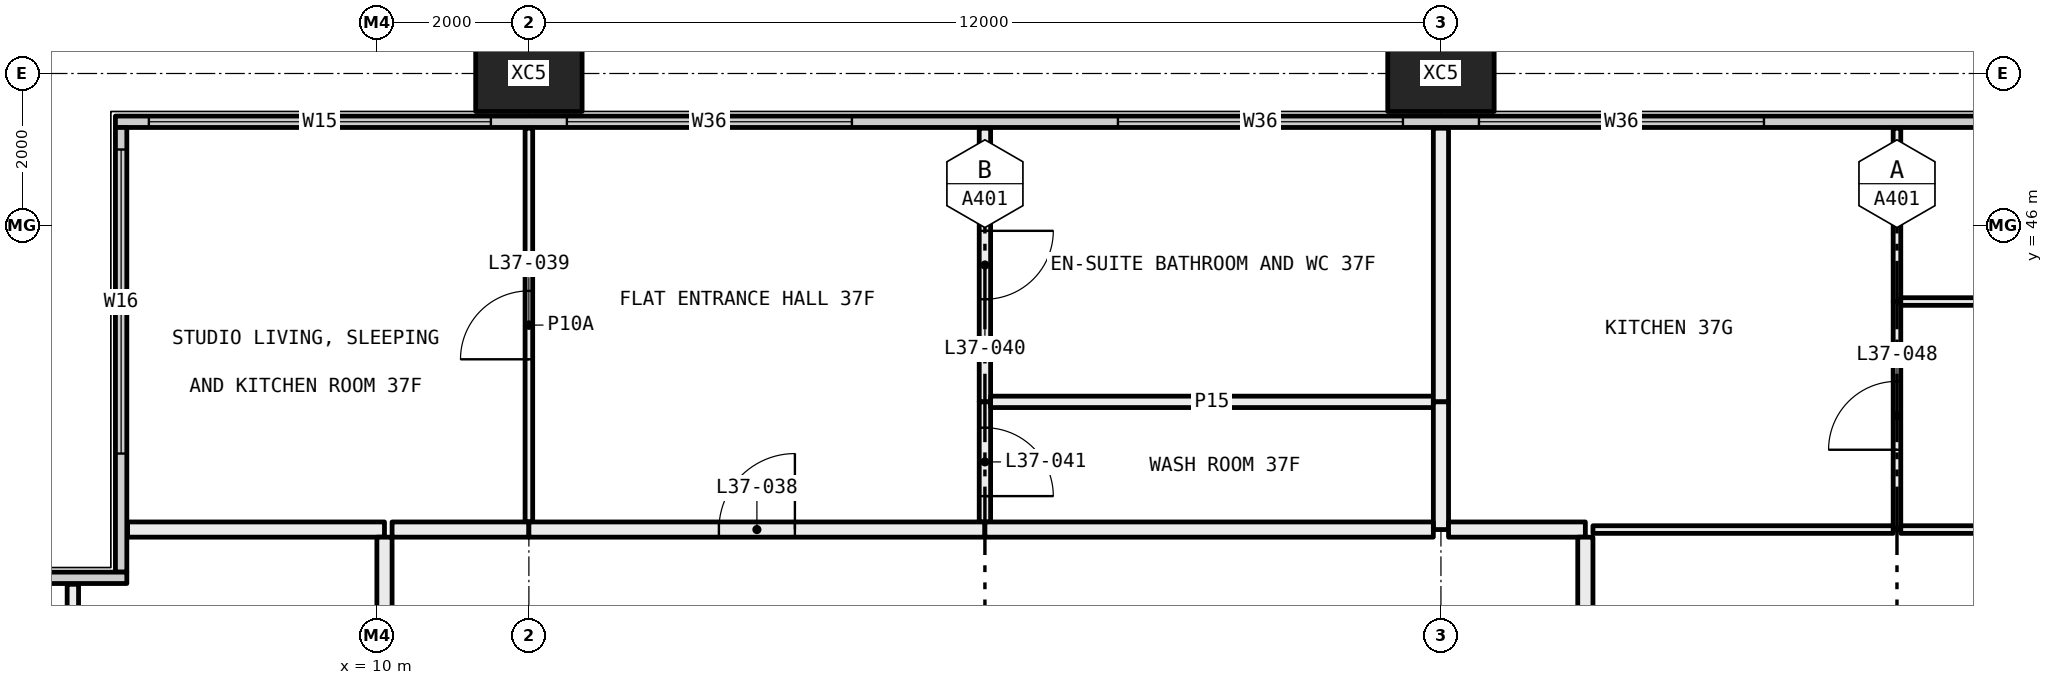
"""IFC4 building model, lengths in metres.
Left out: names, types, materials, properties, quantities, classifications, styles, units other than length and angle.
Written with IfcOpenShell. Run it as: python <this file> out.ifc"""

import sys

from ifc_helpers import new_model, si_unit, direction, frame, frame_2d, origin, origin_2d, place, context, subcontext, project, spatial, rectangle, hollow_rectangle, extrude, element, fill, save


model = new_model("IFC4")
c1 = context("Model", 3, precision=1e-05, world=origin(), true_north=direction((0.0, 1.0)))
c2 = subcontext(c1, "Body", "Model", "MODEL_VIEW")
j1 = project(units=[si_unit("LENGTHUNIT", "METRE"), si_unit("PLANEANGLEUNIT", "RADIAN")], contexts=[c1])
p1 = place(None, origin())
s1 = spatial("IfcSite", under=j1, at=p1, CompositionType="ELEMENT")
p2 = place(p1, origin())
s2 = spatial("IfcBuilding", under=s1, at=p2, CompositionType="ELEMENT")
p3 = place(p2, frame((0.0, 0.0, 141.45)))
s3 = spatial("IfcBuildingStorey", under=s2, at=p3, CompositionType="ELEMENT", Elevation=141.45)
for number, where, z_axis, x_axis in (
    (1, (12.0, 48.0, -0.4), (0.0, 0.0, 1.0), (1.0, 0.0, 0.0)),
    (2, (24.0, 48.0, -0.4), (0.0, 0.0, 1.0), (1.0, 0.0, 0.0)),
):
    element("IfcColumn", number, at=place(p3, frame(where, z_axis=z_axis, x_axis=x_axis)), inside=s3, PredefinedType="COLUMN", context=c2, shape_type="SweptSolid", body=[
        extrude(hollow_rectangle(XDim=1.4, YDim=1.0, WallThickness=0.055, at=origin_2d()), origin(), (0.0, 0.0, 1.0), 3.45),
    ])
p4 = place(p3, frame((6.56, 47.365, 0.0), z_axis=(0.0, 0.0, 1.0), x_axis=(1.0, 0.0, 0.0)))
e3 = element("IfcWall", 3, at=p4, inside=s3, PredefinedType="ELEMENTEDWALL", context=c2, shape_type="SweptSolid", body=[
    extrude(rectangle(XDim=58.88, YDim=0.15, at=frame_2d((29.44, 0.0))), origin(), (0.0, 0.0, 1.0), 3.05),
])
p5 = place(p4, frame((0.44, 0.0, 0.45)))
e4 = element("IfcOpeningElement", 4, at=p5, cuts=e3, PredefinedType="OPENING", context=c2, shape_type="SweptSolid", body=[
    extrude(rectangle(XDim=4.5, YDim=2.55, at=frame_2d((2.25, 1.275))), frame((0.0, 0.085, 0.0), z_axis=(0.0, -1.0, 0.0), x_axis=(1.0, 0.0, 0.0)), (0.0, 0.0, 1.0), 0.17),
])
p6 = place(p4, frame((5.94, 0.0, 0.45)))
e5 = element("IfcOpeningElement", 5, at=p6, cuts=e3, PredefinedType="OPENING", context=c2, shape_type="SweptSolid", body=[
    extrude(rectangle(XDim=3.75, YDim=2.55, at=frame_2d((1.875, 1.275))), frame((0.0, 0.085, 0.0), z_axis=(0.0, -1.0, 0.0), x_axis=(1.0, 0.0, 0.0)), (0.0, 0.0, 1.0), 0.17),
])
p7 = place(p4, frame((13.19, 0.0, 0.45)))
e6 = element("IfcOpeningElement", 6, at=p7, cuts=e3, PredefinedType="OPENING", context=c2, shape_type="SweptSolid", body=[
    extrude(rectangle(XDim=3.75, YDim=2.55, at=frame_2d((1.875, 1.275))), frame((0.0, 0.085, 0.0), z_axis=(0.0, -1.0, 0.0), x_axis=(1.0, 0.0, 0.0)), (0.0, 0.0, 1.0), 0.17),
])
p8 = place(p4, frame((17.94, 0.0, 0.45)))
e7 = element("IfcOpeningElement", 7, at=p8, cuts=e3, PredefinedType="OPENING", context=c2, shape_type="SweptSolid", body=[
    extrude(rectangle(XDim=3.75, YDim=2.55, at=frame_2d((1.875, 1.275))), frame((0.0, 0.085, 0.0), z_axis=(0.0, -1.0, 0.0), x_axis=(1.0, 0.0, 0.0)), (0.0, 0.0, 1.0), 0.17),
])
p9 = place(p4, frame((25.19, 0.0, 0.45)))
e8 = element("IfcOpeningElement", 8, at=p9, cuts=e3, PredefinedType="OPENING", context=c2, shape_type="SweptSolid", body=[
    extrude(rectangle(XDim=0.75, YDim=2.55, at=frame_2d((0.375, 1.275))), frame((0.0, 0.085, 0.0), z_axis=(0.0, -1.0, 0.0), x_axis=(1.0, 0.0, 0.0)), (0.0, 0.0, 1.0), 0.17),
])
p10 = place(p4, frame((26.94, 0.0, 0.45)))
e9 = element("IfcOpeningElement", 9, at=p10, cuts=e3, PredefinedType="OPENING", context=c2, shape_type="SweptSolid", body=[
    extrude(rectangle(XDim=2.0, YDim=2.55, at=frame_2d((1.0, 1.275))), frame((0.0, 0.085, 0.0), z_axis=(0.0, -1.0, 0.0), x_axis=(1.0, 0.0, 0.0)), (0.0, 0.0, 1.0), 0.17),
])
p11 = place(p4, frame((29.94, 0.0, 0.45)))
e10 = element("IfcOpeningElement", 10, at=p11, cuts=e3, PredefinedType="OPENING", context=c2, shape_type="SweptSolid", body=[
    extrude(rectangle(XDim=3.75, YDim=2.55, at=frame_2d((1.875, 1.275))), frame((0.0, 0.085, 0.0), z_axis=(0.0, -1.0, 0.0), x_axis=(1.0, 0.0, 0.0)), (0.0, 0.0, 1.0), 0.17),
])
p12 = place(p4, frame((37.19, 0.0, 0.45)))
e11 = element("IfcOpeningElement", 11, at=p12, cuts=e3, PredefinedType="OPENING", context=c2, shape_type="SweptSolid", body=[
    extrude(rectangle(XDim=3.75, YDim=2.55, at=frame_2d((1.875, 1.275))), frame((0.0, 0.085, 0.0), z_axis=(0.0, -1.0, 0.0), x_axis=(1.0, 0.0, 0.0)), (0.0, 0.0, 1.0), 0.17),
])
p13 = place(p4, frame((41.94, 0.0, 0.45)))
e12 = element("IfcOpeningElement", 12, at=p13, cuts=e3, PredefinedType="OPENING", context=c2, shape_type="SweptSolid", body=[
    extrude(rectangle(XDim=3.75, YDim=2.55, at=frame_2d((1.875, 1.275))), frame((0.0, 0.085, 0.0), z_axis=(0.0, -1.0, 0.0), x_axis=(1.0, 0.0, 0.0)), (0.0, 0.0, 1.0), 0.17),
])
p14 = place(p4, frame((49.19, 0.0, 0.45)))
e13 = element("IfcOpeningElement", 13, at=p14, cuts=e3, PredefinedType="OPENING", context=c2, shape_type="SweptSolid", body=[
    extrude(rectangle(XDim=0.75, YDim=2.55, at=frame_2d((0.375, 1.275))), frame((0.0, 0.085, 0.0), z_axis=(0.0, -1.0, 0.0), x_axis=(1.0, 0.0, 0.0)), (0.0, 0.0, 1.0), 0.17),
])
p15 = place(p4, frame((50.94, 0.0, 0.45)))
e14 = element("IfcOpeningElement", 14, at=p15, cuts=e3, PredefinedType="OPENING", context=c2, shape_type="SweptSolid", body=[
    extrude(rectangle(XDim=2.0, YDim=2.55, at=frame_2d((1.0, 1.275))), frame((0.0, 0.085, 0.0), z_axis=(0.0, -1.0, 0.0), x_axis=(1.0, 0.0, 0.0)), (0.0, 0.0, 1.0), 0.17),
])
p16 = place(p4, frame((53.94, 0.0, 0.45)))
e15 = element("IfcOpeningElement", 15, at=p16, cuts=e3, PredefinedType="OPENING", context=c2, shape_type="SweptSolid", body=[
    extrude(rectangle(XDim=4.5, YDim=2.55, at=frame_2d((2.25, 1.275))), frame((0.0, 0.085, 0.0), z_axis=(0.0, -1.0, 0.0), x_axis=(1.0, 0.0, 0.0)), (0.0, 0.0, 1.0), 0.17),
])
p17 = place(p3, frame((6.635, 41.44, 0.0), z_axis=(0.0, 0.0, 1.0), x_axis=(0.0, 1.0, 0.0)))
e16 = element("IfcWall", 16, at=p17, inside=s3, PredefinedType="ELEMENTEDWALL", context=c2, shape_type="SweptSolid", body=[
    extrude(rectangle(XDim=5.85, YDim=0.15, at=frame_2d((2.925, 0.0))), origin(), (0.0, 0.0, 1.0), 3.05),
])
p18 = place(p17, frame((1.56, 0.0, 0.45)))
e17 = element("IfcOpeningElement", 17, at=p18, cuts=e16, PredefinedType="OPENING", context=c2, shape_type="SweptSolid", body=[
    extrude(rectangle(XDim=4.0, YDim=2.55, at=frame_2d((2.0, 1.275))), frame((0.0, 0.085, 0.0), z_axis=(0.0, -1.0, 0.0), x_axis=(1.0, 0.0, 0.0)), (0.0, 0.0, 1.0), 0.17),
])
p19 = place(p3, frame((0.56, 41.365, 0.0), z_axis=(0.0, 0.0, 1.0), x_axis=(1.0, 0.0, 0.0)))
e18 = element("IfcWall", 18, at=p19, inside=s3, PredefinedType="ELEMENTEDWALL", context=c2, shape_type="SweptSolid", body=[
    extrude(rectangle(XDim=6.15, YDim=0.15, at=frame_2d((3.075, 0.0))), origin(), (0.0, 0.0, 1.0), 3.05),
])
p20 = place(p19, frame((0.44, 0.0, 0.45)))
e19 = element("IfcOpeningElement", 19, at=p20, cuts=e18, PredefinedType="OPENING", context=c2, shape_type="SweptSolid", body=[
    extrude(rectangle(XDim=4.0, YDim=2.55, at=frame_2d((2.0, 1.275))), frame((0.0, 0.085, 0.0), z_axis=(0.0, -1.0, 0.0), x_axis=(1.0, 0.0, 0.0)), (0.0, 0.0, 1.0), 0.17),
])
p21 = place(p3, frame((6.0, 37.5, 0.0), z_axis=(0.0, 0.0, 1.0), x_axis=(0.0, 1.0, 0.0)))
e20 = element("IfcWall", 20, at=p21, inside=s3, PredefinedType="PARTITIONING", context=c2, shape_type="SweptSolid", body=[
    extrude(rectangle(XDim=3.78, YDim=0.15, at=frame_2d((1.89, 0.0))), origin(), (0.0, 0.0, 1.0), 3.05),
])
p22 = place(p3, frame((10.1, 42.0, 0.0), z_axis=(0.0, 0.0, 1.0), x_axis=(-1.0, 0.0, 0.0)))
e21 = element("IfcWall", 21, at=p22, inside=s3, PredefinedType="PARTITIONING", context=c2, shape_type="SweptSolid", body=[
    extrude(rectangle(XDim=3.38, YDim=0.2, at=frame_2d((1.69, 0.0))), origin(), (0.0, 0.0, 1.0), 3.05),
])
p23 = place(p3, frame((10.1, 37.5, 0.0), z_axis=(0.0, 0.0, 1.0), x_axis=(0.0, 1.0, 0.0)))
e22 = element("IfcWall", 22, at=p23, inside=s3, PredefinedType="PARTITIONING", context=c2, shape_type="SweptSolid", body=[
    extrude(rectangle(XDim=4.4, YDim=0.2, at=frame_2d((2.2, 0.0))), origin(), (0.0, 0.0, 1.0), 3.05),
])
p24 = place(p3, frame((12.0, 42.1, 0.0), z_axis=(0.0, 0.0, 1.0), x_axis=(0.0, 1.0, 0.0)))
e23 = element("IfcWall", 23, at=p24, inside=s3, PredefinedType="PARTITIONING", context=c2, shape_type="SweptSolid", body=[
    extrude(rectangle(XDim=5.18, YDim=0.1, at=frame_2d((2.59, 0.0))), origin(), (0.0, 0.0, 1.0), 3.05),
])
p25 = place(p24, frame((2.14, 0.0, 0.0)))
e24 = element("IfcOpeningElement", 24, at=p25, cuts=e23, PredefinedType="OPENING", context=c2, shape_type="SweptSolid", body=[
    extrude(rectangle(XDim=0.9, YDim=2.1, at=frame_2d((0.45, 1.05))), frame((0.0, 0.06, 0.0), z_axis=(0.0, -1.0, 0.0), x_axis=(1.0, 0.0, 0.0)), (0.0, 0.0, 1.0), 0.12),
])
p26 = place(p3, frame((10.2, 42.0, 0.0), z_axis=(0.0, 0.0, 1.0), x_axis=(1.0, 0.0, 0.0)))
e25 = element("IfcWall", 25, at=p26, inside=s3, PredefinedType="PARTITIONING", context=c2, shape_type="SweptSolid", body=[
    extrude(rectangle(XDim=1.8, YDim=0.2, at=frame_2d((0.9, 0.0))), origin(), (0.0, 0.0, 1.0), 3.05),
])
p27 = place(p3, frame((18.0, 43.68, 0.0), z_axis=(0.0, 0.0, 1.0), x_axis=(0.0, 1.0, 0.0)))
e26 = element("IfcWall", 26, at=p27, inside=s3, PredefinedType="PARTITIONING", context=c2, shape_type="SweptSolid", body=[
    extrude(rectangle(XDim=3.6, YDim=0.15, at=frame_2d((1.8, 0.0))), origin(), (0.0, 0.0, 1.0), 3.05),
])
p28 = place(p27, frame((1.35, 0.0, 0.0)))
e27 = element("IfcOpeningElement", 27, at=p28, cuts=e26, PredefinedType="OPENING", context=c2, shape_type="SweptSolid", body=[
    extrude(rectangle(XDim=0.9, YDim=2.1, at=frame_2d((0.45, 1.05))), frame((0.0, 0.085, 0.0), z_axis=(0.0, -1.0, 0.0), x_axis=(1.0, 0.0, 0.0)), (0.0, 0.0, 1.0), 0.17),
])
p29 = place(p3, frame((18.0, 42.1, 0.0), z_axis=(0.0, 0.0, 1.0), x_axis=(0.0, 1.0, 0.0)))
e28 = element("IfcWall", 28, at=p29, inside=s3, PredefinedType="PARTITIONING", context=c2, shape_type="SweptSolid", body=[
    extrude(rectangle(XDim=1.58, YDim=0.15, at=frame_2d((0.79, 0.0))), origin(), (0.0, 0.0, 1.0), 3.05),
])
p30 = place(p29, frame((0.34, 0.0, 0.0)))
e29 = element("IfcOpeningElement", 29, at=p30, cuts=e28, PredefinedType="OPENING", context=c2, shape_type="SweptSolid", body=[
    extrude(rectangle(XDim=0.9, YDim=2.1, at=frame_2d((0.45, 1.05))), frame((0.0, 0.085, 0.0), z_axis=(0.0, -1.0, 0.0), x_axis=(1.0, 0.0, 0.0)), (0.0, 0.0, 1.0), 0.17),
])
p31 = place(p3, frame((12.0, 42.0, 0.0), z_axis=(0.0, 0.0, 1.0), x_axis=(1.0, 0.0, 0.0)))
e30 = element("IfcWall", 30, at=p31, inside=s3, PredefinedType="PARTITIONING", context=c2, shape_type="SweptSolid", body=[
    extrude(rectangle(XDim=6.0, YDim=0.2, at=frame_2d((3.0, 0.0))), origin(), (0.0, 0.0, 1.0), 3.05),
])
p32 = place(p31, frame((2.5, 0.0, 0.0)))
e31 = element("IfcOpeningElement", 31, at=p32, cuts=e30, PredefinedType="OPENING", context=c2, shape_type="SweptSolid", body=[
    extrude(rectangle(XDim=1.0, YDim=2.1, at=frame_2d((0.5, 1.05))), frame((0.0, 0.11, 0.0), z_axis=(0.0, -1.0, 0.0), x_axis=(1.0, 0.0, 0.0)), (0.0, 0.0, 1.0), 0.22),
])
p33 = place(p3, frame((18.075, 43.68, 0.0), z_axis=(0.0, 0.0, 1.0), x_axis=(1.0, 0.0, 0.0)))
e32 = element("IfcWall", 32, at=p33, inside=s3, PredefinedType="PARTITIONING", context=c2, shape_type="SweptSolid", body=[
    extrude(rectangle(XDim=5.825, YDim=0.15, at=frame_2d((2.913, 0.0))), origin(), (0.0, 0.0, 1.0), 3.05),
])
p34 = place(p3, frame((24.0, 43.68, 0.0), z_axis=(0.0, 0.0, 1.0), x_axis=(0.0, 1.0, 0.0)))
e33 = element("IfcWall", 33, at=p34, inside=s3, PredefinedType="PARTITIONING", context=c2, shape_type="SweptSolid", body=[
    extrude(rectangle(XDim=3.6, YDim=0.2, at=frame_2d((1.8, 0.0))), origin(), (0.0, 0.0, 1.0), 3.05),
])
p35 = place(p3, frame((24.0, 42.0, 0.0), z_axis=(0.0, 0.0, 1.0), x_axis=(0.0, 1.0, 0.0)))
e34 = element("IfcWall", 34, at=p35, inside=s3, PredefinedType="PARTITIONING", context=c2, shape_type="SweptSolid", body=[
    extrude(rectangle(XDim=1.68, YDim=0.2, at=frame_2d((0.84, 0.0))), origin(), (0.0, 0.0, 1.0), 3.05),
])
p36 = place(p3, frame((18.0, 42.0, 0.0), z_axis=(0.0, 0.0, 1.0), x_axis=(1.0, 0.0, 0.0)))
e35 = element("IfcWall", 35, at=p36, inside=s3, PredefinedType="PARTITIONING", context=c2, shape_type="SweptSolid", body=[
    extrude(rectangle(XDim=5.9, YDim=0.2, at=frame_2d((2.95, 0.0))), origin(), (0.0, 0.0, 1.0), 3.05),
])
p37 = place(p3, frame((30.0, 42.0, 0.0), z_axis=(0.0, 0.0, 1.0), x_axis=(0.0, 1.0, 0.0)))
e36 = element("IfcWall", 36, at=p37, inside=s3, PredefinedType="PARTITIONING", context=c2, shape_type="SweptSolid", body=[
    extrude(rectangle(XDim=3.0, YDim=0.1, at=frame_2d((1.5, 0.0))), origin(), (0.0, 0.0, 1.0), 3.05),
])
p38 = place(p37, frame((1.05, 0.0, 0.0)))
e37 = element("IfcOpeningElement", 37, at=p38, cuts=e36, PredefinedType="OPENING", context=c2, shape_type="SweptSolid", body=[
    extrude(rectangle(XDim=0.9, YDim=2.1, at=frame_2d((0.45, 1.05))), frame((0.0, 0.06, 0.0), z_axis=(0.0, -1.0, 0.0), x_axis=(1.0, 0.0, 0.0)), (0.0, 0.0, 1.0), 0.12),
])
p39 = place(p3, frame((30.0, 45.0, 0.0), z_axis=(0.0, 0.0, 1.0), x_axis=(0.0, 1.0, 0.0)))
e38 = element("IfcWall", 38, at=p39, inside=s3, PredefinedType="PARTITIONING", context=c2, shape_type="SweptSolid", body=[
    extrude(rectangle(XDim=2.28, YDim=0.1, at=frame_2d((1.14, 0.0))), origin(), (0.0, 0.0, 1.0), 3.05),
])
p40 = place(p3, frame((26.0, 42.0, 0.0), z_axis=(0.0, 0.0, 1.0), x_axis=(1.0, 0.0, 0.0)))
e39 = element("IfcWall", 39, at=p40, inside=s3, PredefinedType="PARTITIONING", context=c2, shape_type="SweptSolid", body=[
    extrude(rectangle(XDim=3.95, YDim=0.1, at=frame_2d((1.975, 0.0))), origin(), (0.0, 0.0, 1.0), 3.05),
])
p41 = place(p3, frame((24.1, 42.0, 0.0), z_axis=(0.0, 0.0, 1.0), x_axis=(1.0, 0.0, 0.0)))
e40 = element("IfcWall", 40, at=p41, inside=s3, PredefinedType="PARTITIONING", context=c2, shape_type="SweptSolid", body=[
    extrude(rectangle(XDim=1.8, YDim=0.2, at=frame_2d((0.9, 0.0))), origin(), (0.0, 0.0, 1.0), 3.05),
])
p42 = place(p3, frame((35.9, 45.0, 0.0), z_axis=(0.0, 0.0, 1.0), x_axis=(-1.0, 0.0, 0.0)))
e41 = element("IfcWall", 41, at=p42, inside=s3, PredefinedType="PARTITIONING", context=c2, shape_type="SweptSolid", body=[
    extrude(rectangle(XDim=5.85, YDim=0.1, at=frame_2d((2.925, 0.0))), origin(), (0.0, 0.0, 1.0), 3.05),
])
p43 = place(p3, frame((30.05, 42.0, 0.0), z_axis=(0.0, 0.0, 1.0), x_axis=(1.0, 0.0, 0.0)))
e42 = element("IfcWall", 42, at=p43, inside=s3, PredefinedType="PARTITIONING", context=c2, shape_type="SweptSolid", body=[
    extrude(rectangle(XDim=5.875, YDim=0.1, at=frame_2d((2.938, 0.0))), origin(), (0.0, 0.0, 1.0), 2.45),
])
p44 = place(p43, frame((2.488, 0.0, 0.0)))
e43 = element("IfcOpeningElement", 43, at=p44, cuts=e42, PredefinedType="OPENING", context=c2, shape_type="SweptSolid", body=[
    extrude(rectangle(XDim=0.9, YDim=2.1, at=frame_2d((0.45, 1.05))), frame((0.0, 0.06, 0.0), z_axis=(0.0, -1.0, 0.0), x_axis=(1.0, 0.0, 0.0)), (0.0, 0.0, 1.0), 0.12),
])
p45 = place(p3, frame((25.9, 41.9, 0.0), z_axis=(0.0, 0.0, 1.0), x_axis=(0.0, -1.0, 0.0)))
e44 = element("IfcWall", 44, at=p45, inside=s3, PredefinedType="PARTITIONING", context=c2, shape_type="SweptSolid", body=[
    extrude(rectangle(XDim=6.2, YDim=0.2, at=frame_2d((3.1, 0.0))), origin(), (0.0, 0.0, 1.0), 2.45),
])
p46 = place(p5, origin())
e45 = element("IfcWindow", 45, at=p46, inside=s3, PartitioningType="SINGLE_PANEL", PredefinedType="WINDOW", context=c2, shape_type="SweptSolid", body=[
    extrude(rectangle(XDim=4.5, YDim=2.55, at=frame_2d((2.25, 1.275))), frame((0.0, 0.03, 0.0), z_axis=(0.0, -1.0, 0.0), x_axis=(1.0, 0.0, 0.0)), (0.0, 0.0, 1.0), 0.06),
])
fill(e4, e45)
p47 = place(p6, origin())
e46 = element("IfcWindow", 46, at=p47, inside=s3, PartitioningType="SINGLE_PANEL", PredefinedType="WINDOW", context=c2, shape_type="SweptSolid", body=[
    extrude(rectangle(XDim=3.75, YDim=2.55, at=frame_2d((1.875, 1.275))), frame((0.0, 0.03, 0.0), z_axis=(0.0, -1.0, 0.0), x_axis=(1.0, 0.0, 0.0)), (0.0, 0.0, 1.0), 0.06),
])
fill(e5, e46)
p48 = place(p7, origin())
e47 = element("IfcWindow", 47, at=p48, inside=s3, PartitioningType="SINGLE_PANEL", PredefinedType="WINDOW", context=c2, shape_type="SweptSolid", body=[
    extrude(rectangle(XDim=3.75, YDim=2.55, at=frame_2d((1.875, 1.275))), frame((0.0, 0.03, 0.0), z_axis=(0.0, -1.0, 0.0), x_axis=(1.0, 0.0, 0.0)), (0.0, 0.0, 1.0), 0.06),
])
fill(e6, e47)
p49 = place(p8, origin())
e48 = element("IfcWindow", 48, at=p49, inside=s3, PartitioningType="SINGLE_PANEL", PredefinedType="WINDOW", context=c2, shape_type="SweptSolid", body=[
    extrude(rectangle(XDim=3.75, YDim=2.55, at=frame_2d((1.875, 1.275))), frame((0.0, 0.03, 0.0), z_axis=(0.0, -1.0, 0.0), x_axis=(1.0, 0.0, 0.0)), (0.0, 0.0, 1.0), 0.06),
])
fill(e7, e48)
p50 = place(p18, origin())
e49 = element("IfcWindow", 49, at=p50, inside=s3, PartitioningType="SINGLE_PANEL", PredefinedType="WINDOW", context=c2, shape_type="SweptSolid", body=[
    extrude(rectangle(XDim=4.0, YDim=2.55, at=frame_2d((2.0, 1.275))), frame((0.0, 0.03, 0.0), z_axis=(0.0, -1.0, 0.0), x_axis=(1.0, 0.0, 0.0)), (0.0, 0.0, 1.0), 0.06),
])
fill(e17, e49)
p51 = place(p32, origin())
e50 = element("IfcDoor", 50, at=p51, inside=s3, OperationType="SINGLE_SWING_LEFT", PredefinedType="DOOR", context=c2, shape_type="SweptSolid", body=[
    extrude(rectangle(XDim=1.0, YDim=2.1, at=frame_2d((0.5, 1.05))), frame((0.0, 0.025, 0.0), z_axis=(0.0, -1.0, 0.0), x_axis=(1.0, 0.0, 0.0)), (0.0, 0.0, 1.0), 0.05),
])
fill(e31, e50)
p52 = place(p25, origin())
e51 = element("IfcDoor", 51, at=p52, inside=s3, OperationType="SINGLE_SWING_RIGHT", PredefinedType="DOOR", context=c2, shape_type="SweptSolid", body=[
    extrude(rectangle(XDim=0.9, YDim=2.1, at=frame_2d((0.45, 1.05))), frame((0.0, 0.025, 0.0), z_axis=(0.0, -1.0, 0.0), x_axis=(1.0, 0.0, 0.0)), (0.0, 0.0, 1.0), 0.05),
])
fill(e24, e51)
p53 = place(p28, frame((0.9, 0.0, 0.0), x_axis=(-1.0, 0.0, 0.0)))
e52 = element("IfcDoor", 52, at=p53, inside=s3, OperationType="SINGLE_SWING_RIGHT", PredefinedType="DOOR", context=c2, shape_type="SweptSolid", body=[
    extrude(rectangle(XDim=0.9, YDim=2.1, at=frame_2d((0.45, 1.05))), frame((0.0, 0.025, 0.0), z_axis=(0.0, -1.0, 0.0), x_axis=(1.0, 0.0, 0.0)), (0.0, 0.0, 1.0), 0.05),
])
fill(e27, e52)
p54 = place(p30, frame((0.9, 0.0, 0.0), x_axis=(-1.0, 0.0, 0.0)))
e53 = element("IfcDoor", 53, at=p54, inside=s3, OperationType="SINGLE_SWING_LEFT", PredefinedType="DOOR", context=c2, shape_type="SweptSolid", body=[
    extrude(rectangle(XDim=0.9, YDim=2.1, at=frame_2d((0.45, 1.05))), frame((0.0, 0.025, 0.0), z_axis=(0.0, -1.0, 0.0), x_axis=(1.0, 0.0, 0.0)), (0.0, 0.0, 1.0), 0.05),
])
fill(e29, e53)
p55 = place(p38, origin())
e54 = element("IfcDoor", 54, at=p55, inside=s3, OperationType="SINGLE_SWING_RIGHT", PredefinedType="DOOR", context=c2, shape_type="SweptSolid", body=[
    extrude(rectangle(XDim=0.9, YDim=2.1, at=frame_2d((0.45, 1.05))), frame((0.0, 0.025, 0.0), z_axis=(0.0, -1.0, 0.0), x_axis=(1.0, 0.0, 0.0)), (0.0, 0.0, 1.0), 0.05),
])
fill(e37, e54)
save(model, sys.argv[1])
